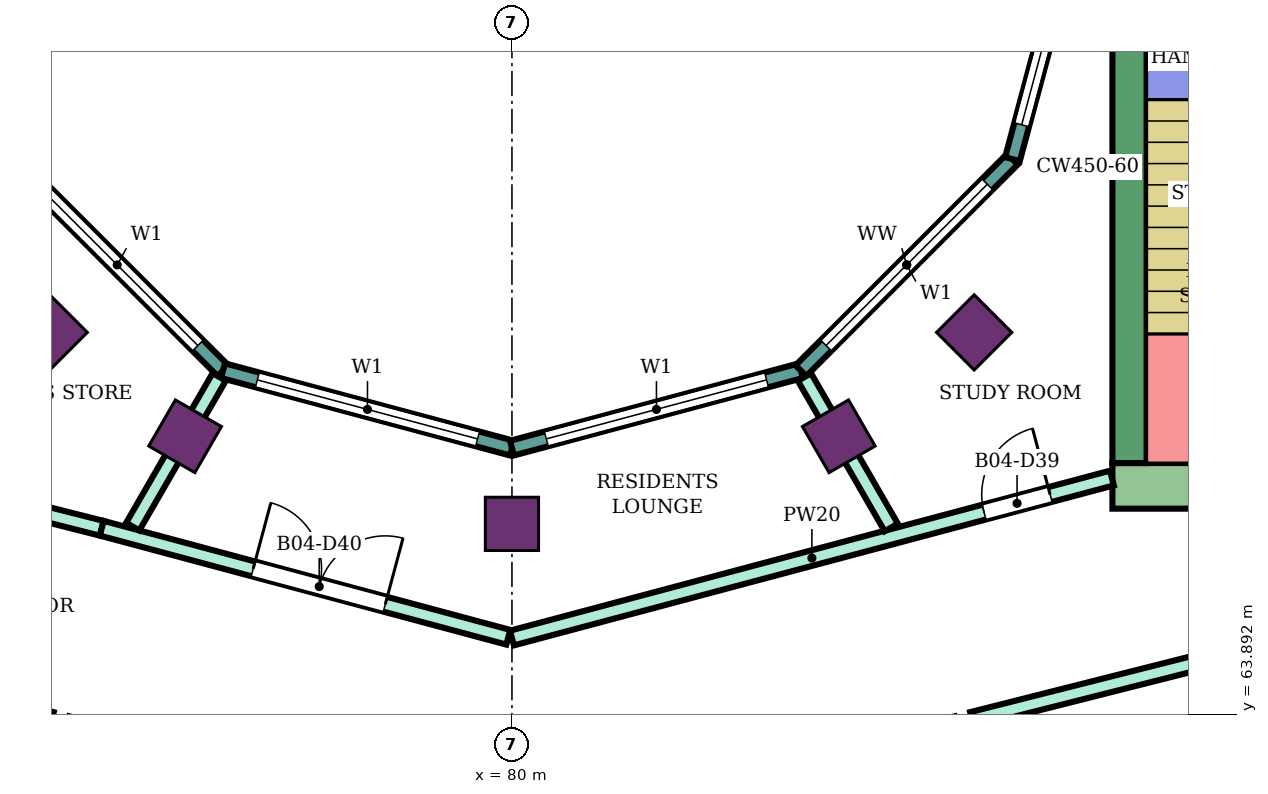
"""IFC4 building model, lengths in metres.
Left out: names, types, materials, properties, quantities, classifications, styles, units other than length and angle.
Written with IfcOpenShell. Run it as: python <this file> out.ifc"""

import sys

from ifc_helpers import new_model, si_unit, direction, frame, frame_2d, origin, origin_2d, place, context, subcontext, project, spatial, rectangle, extrude, element, fill, save


model = new_model("IFC4")
c1 = context("Model", 3, precision=1e-05, world=origin(), true_north=direction((0.0, 1.0)))
c2 = subcontext(c1, "Body", "Model", "MODEL_VIEW")
j1 = project(units=[si_unit("LENGTHUNIT", "METRE"), si_unit("PLANEANGLEUNIT", "RADIAN")], contexts=[c1])
p1 = place(None, origin())
s1 = spatial("IfcSite", under=j1, at=p1, CompositionType="ELEMENT")
p2 = place(p1, origin())
s2 = spatial("IfcBuilding", under=s1, at=p2, CompositionType="ELEMENT")
p3 = place(p2, frame((0.0, 0.0, 258.3)))
s3 = spatial("IfcBuildingStorey", under=s2, at=p3, CompositionType="ELEMENT", Elevation=258.3)
for number, where, z_axis, x_axis in (
    (1, (73.919, 68.919, 0.0), (0.0, 0.0, 1.0), (-0.707, -0.707, 0.0)),
    (2, (75.7, 67.552, 0.0), (0.0, 0.0, 1.0), (-0.5, -0.866, 0.0)),
    (3, (80.0, 66.4, 0.0), (0.0, 0.0, 1.0), (0.0, -1.0, 0.0)),
    (4, (84.3, 67.552, 0.0), (0.0, 0.0, 1.0), (0.5, -0.866, 0.0)),
    (5, (86.081, 68.919, 0.0), (0.0, 0.0, 1.0), (0.707, -0.707, 0.0)),
):
    element("IfcColumn", number, at=place(p3, frame(where, z_axis=z_axis, x_axis=x_axis)), inside=s3, PredefinedType="COLUMN", context=c2, shape_type="SweptSolid", body=[
        extrude(rectangle(XDim=0.7, YDim=0.7, at=origin_2d()), origin(), (0.0, 0.0, 1.0), 4.2),
    ])
p4 = place(p3, frame((87.9, 66.9, 0.0), z_axis=(0.0, 0.0, 1.0), x_axis=(1.0, 0.0, 0.0)))
e6 = element("IfcWall", 6, at=p4, inside=s3, PredefinedType="SHEAR", context=c2, shape_type="SweptSolid", body=[
    extrude(rectangle(XDim=14.9, YDim=0.6, at=frame_2d((7.45, 0.0))), origin(), (0.0, 0.0, 1.0), 3.88),
])
p5 = place(p4, frame((4.2, 0.0, 0.0)))
e7 = element("IfcOpeningElement", 7, at=p5, cuts=e6, PredefinedType="OPENING", context=c2, shape_type="SweptSolid", body=[
    extrude(rectangle(XDim=2.4, YDim=2.4, at=frame_2d((1.2, 1.2))), frame((0.0, 0.31, 0.0), z_axis=(0.0, -1.0, 0.0), x_axis=(1.0, 0.0, 0.0)), (0.0, 0.0, 1.0), 0.62),
])
p6 = place(p3, frame((88.125, 67.2, 0.0), z_axis=(0.0, 0.0, 1.0), x_axis=(0.0, 1.0, 0.0)))
e8 = element("IfcWall", 8, at=p6, inside=s3, PredefinedType="SHEAR", context=c2, shape_type="SweptSolid", body=[
    extrude(rectangle(XDim=7.8, YDim=0.45, at=frame_2d((3.9, 0.0))), origin(), (0.0, 0.0, 1.0), 3.88),
])
p7 = place(p3, frame((73.415, 71.198, 0.0), z_axis=(0.0, 0.0, 1.0), x_axis=(0.707106781187, -0.707106781187, 0.0)))
e9 = element("IfcWall", 9, at=p7, inside=s3, PredefinedType="NOTDEFINED", context=c2, shape_type="SweptSolid", body=[
    extrude(rectangle(XDim=3.936, YDim=0.2, at=frame_2d((1.968, 0.0))), origin(), (0.0, 0.0, 1.0), 4.2),
])
p8 = place(p7, frame((0.468, 0.0, 0.9)))
e10 = element("IfcOpeningElement", 10, at=p8, cuts=e9, PredefinedType="OPENING", context=c2, shape_type="SweptSolid", body=[
    extrude(rectangle(XDim=3.0, YDim=2.3, at=frame_2d((1.5, 1.15))), frame((0.0, 0.11, 0.0), z_axis=(0.0, -1.0, 0.0), x_axis=(1.0, 0.0, 0.0)), (0.0, 0.0, 1.0), 0.22),
])
p9 = place(p3, frame((76.198, 68.415, 0.0), z_axis=(0.0, 0.0, 1.0), x_axis=(0.965933654434, -0.258789828301, 0.0)))
e11 = element("IfcWall", 11, at=p9, inside=s3, PredefinedType="NOTDEFINED", context=c2, shape_type="SweptSolid", body=[
    extrude(rectangle(XDim=3.936, YDim=0.2, at=frame_2d((1.968, 0.0))), origin(), (0.0, 0.0, 1.0), 4.2),
])
p10 = place(p9, frame((0.468, 0.0, 0.9)))
e12 = element("IfcOpeningElement", 12, at=p10, cuts=e11, PredefinedType="OPENING", context=c2, shape_type="SweptSolid", body=[
    extrude(rectangle(XDim=3.0, YDim=2.3, at=frame_2d((1.5, 1.15))), frame((0.0, 0.11, 0.0), z_axis=(0.0, -1.0, 0.0), x_axis=(1.0, 0.0, 0.0)), (0.0, 0.0, 1.0), 0.22),
])
p11 = place(p3, frame((80.0, 67.396, 0.0), z_axis=(0.0, 0.0, 1.0), x_axis=(0.965933654434, 0.258789828301, 0.0)))
e13 = element("IfcWall", 13, at=p11, inside=s3, PredefinedType="NOTDEFINED", context=c2, shape_type="SweptSolid", body=[
    extrude(rectangle(XDim=3.936, YDim=0.2, at=frame_2d((1.968, 0.0))), origin(), (0.0, 0.0, 1.0), 4.2),
])
p12 = place(p11, frame((0.468, 0.0, 0.9)))
e14 = element("IfcOpeningElement", 14, at=p12, cuts=e13, PredefinedType="OPENING", context=c2, shape_type="SweptSolid", body=[
    extrude(rectangle(XDim=3.0, YDim=2.3, at=frame_2d((1.5, 1.15))), frame((0.0, 0.11, 0.0), z_axis=(0.0, -1.0, 0.0), x_axis=(1.0, 0.0, 0.0)), (0.0, 0.0, 1.0), 0.22),
])
p13 = place(p3, frame((83.802, 68.415, 0.0), z_axis=(0.0, 0.0, 1.0), x_axis=(0.707106781187, 0.707106781187, 0.0)))
e15 = element("IfcWall", 15, at=p13, inside=s3, PredefinedType="NOTDEFINED", context=c2, shape_type="SweptSolid", body=[
    extrude(rectangle(XDim=3.936, YDim=0.2, at=frame_2d((1.968, 0.0))), origin(), (0.0, 0.0, 1.0), 4.2),
])
p14 = place(p13, frame((0.468, 0.0, 0.9)))
e16 = element("IfcOpeningElement", 16, at=p14, cuts=e15, PredefinedType="OPENING", context=c2, shape_type="SweptSolid", body=[
    extrude(rectangle(XDim=3.0, YDim=2.3, at=frame_2d((1.5, 1.15))), frame((0.0, 0.11, 0.0), z_axis=(0.0, -1.0, 0.0), x_axis=(1.0, 0.0, 0.0)), (0.0, 0.0, 1.0), 0.22),
])
p15 = place(p3, frame((86.585, 71.198, 0.0), z_axis=(0.0, 0.0, 1.0), x_axis=(0.258789828301, 0.965933654434, 0.0)))
e17 = element("IfcWall", 17, at=p15, inside=s3, PredefinedType="NOTDEFINED", context=c2, shape_type="SweptSolid", body=[
    extrude(rectangle(XDim=3.936, YDim=0.2, at=frame_2d((1.968, 0.0))), origin(), (0.0, 0.0, 1.0), 4.2),
])
p16 = place(p15, frame((0.468, 0.0, 0.9)))
e18 = element("IfcOpeningElement", 18, at=p16, cuts=e17, PredefinedType="OPENING", context=c2, shape_type="SweptSolid", body=[
    extrude(rectangle(XDim=3.0, YDim=2.3, at=frame_2d((1.5, 1.15))), frame((0.0, 0.11, 0.0), z_axis=(0.0, -1.0, 0.0), x_axis=(1.0, 0.0, 0.0)), (0.0, 0.0, 1.0), 0.22),
])
p17 = place(p3, frame((68.2, 65.28, 0.0), z_axis=(0.0, 0.0, 1.0), x_axis=(0.969450596516, -0.245286650503, 0.0)))
e19 = element("IfcWall", 19, at=p17, inside=s3, PredefinedType="PARTITIONING", context=c2, shape_type="SweptSolid", body=[
    extrude(rectangle(XDim=5.928, YDim=0.2, at=frame_2d((2.964, 0.0))), origin(), (0.0, 0.0, 1.0), 3.75),
])
p18 = place(p3, frame((72.1, 66.975, 0.0), z_axis=(0.0, 0.0, 1.0), x_axis=(0.969471314457, -0.245204752086, 0.0)))
e20 = element("IfcWall", 20, at=p18, inside=s3, PredefinedType="PARTITIONING", context=c2, shape_type="SweptSolid", body=[
    extrude(rectangle(XDim=2.582, YDim=0.2, at=frame_2d((1.291, 0.0))), origin(), (0.0, 0.0, 1.0), 3.75),
])
p19 = place(p18, frame((0.841, 0.0, 0.0)))
e21 = element("IfcOpeningElement", 21, at=p19, cuts=e20, PredefinedType="OPENING", context=c2, shape_type="SweptSolid", body=[
    extrude(rectangle(XDim=0.9, YDim=2.1, at=frame_2d((0.45, 1.05))), frame((0.0, 0.11, 0.0), z_axis=(0.0, -1.0, 0.0), x_axis=(1.0, 0.0, 0.0)), (0.0, 0.0, 1.0), 0.22),
])
p20 = place(p3, frame((74.603, 66.342, 0.0), z_axis=(0.0, 0.0, 1.0), x_axis=(0.965895298152, -0.258932950796, 0.0)))
e22 = element("IfcWall", 22, at=p20, inside=s3, PredefinedType="PARTITIONING", context=c2, shape_type="SweptSolid", body=[
    extrude(rectangle(XDim=5.538, YDim=0.2, at=frame_2d((2.769, 0.0))), origin(), (0.0, 0.0, 1.0), 3.75),
])
p21 = place(p20, frame((2.062, 0.0, 0.0)))
e23 = element("IfcOpeningElement", 23, at=p21, cuts=e22, PredefinedType="OPENING", context=c2, shape_type="SweptSolid", body=[
    extrude(rectangle(XDim=1.8, YDim=2.1, at=frame_2d((0.9, 1.05))), frame((0.0, 0.11, 0.0), z_axis=(0.0, -1.0, 0.0), x_axis=(1.0, 0.0, 0.0)), (0.0, 0.0, 1.0), 0.22),
])
p22 = place(p3, frame((75.011, 66.364, 0.0), z_axis=(0.0, 0.0, 1.0), x_axis=(0.500121996664, 0.86595495752, 0.0)))
e24 = element("IfcWall", 24, at=p22, inside=s3, PredefinedType="PARTITIONING", context=c2, shape_type="SweptSolid", body=[
    extrude(rectangle(XDim=2.274, YDim=0.2, at=frame_2d((1.137, 0.0))), origin(), (0.0, 0.0, 1.0), 3.75),
])
p23 = place(p3, frame((80.0, 64.898, 0.0), z_axis=(0.0, 0.0, 1.0), x_axis=(0.966237419782, 0.257653349704, 0.0)))
e25 = element("IfcWall", 25, at=p23, inside=s3, PredefinedType="PARTITIONING", context=c2, shape_type="SweptSolid", body=[
    extrude(rectangle(XDim=8.169, YDim=0.2, at=frame_2d((4.084, 0.0))), origin(), (0.0, 0.0, 1.0), 3.75),
])
p24 = place(p23, frame((6.428, 0.0, 0.0)))
e26 = element("IfcOpeningElement", 26, at=p24, cuts=e25, PredefinedType="OPENING", context=c2, shape_type="SweptSolid", body=[
    extrude(rectangle(XDim=0.9, YDim=2.1, at=frame_2d((0.45, 1.05))), frame((0.0, 0.11, 0.0), z_axis=(0.0, -1.0, 0.0), x_axis=(1.0, 0.0, 0.0)), (0.0, 0.0, 1.0), 0.22),
])
p25 = place(p3, frame((83.848, 68.331, 0.0), z_axis=(0.0, 0.0, 1.0), x_axis=(0.499851978358, -0.866110847255, 0.0)))
e27 = element("IfcWall", 27, at=p25, inside=s3, PredefinedType="PARTITIONING", context=c2, shape_type="SweptSolid", body=[
    extrude(rectangle(XDim=2.284, YDim=0.2, at=frame_2d((1.142, 0.0))), origin(), (0.0, 0.0, 1.0), 3.75),
])
p26 = place(p3, frame((86.053, 63.826, 0.0), z_axis=(0.0, 0.0, 1.0), x_axis=(0.969490004987, 0.245130843083, 0.0)))
e28 = element("IfcWall", 28, at=p26, inside=s3, PredefinedType="PARTITIONING", context=c2, shape_type="SweptSolid", body=[
    extrude(rectangle(XDim=5.908, YDim=0.2, at=frame_2d((2.954, 0.0))), origin(), (0.0, 0.0, 1.0), 3.75),
])
p27 = place(p8, origin())
e29 = element("IfcWindow", 29, at=p27, inside=s3, PartitioningType="SINGLE_PANEL", PredefinedType="WINDOW", context=c2, shape_type="SweptSolid", body=[
    extrude(rectangle(XDim=3.0, YDim=2.3, at=frame_2d((1.5, 1.15))), frame((0.0, 0.03, 0.0), z_axis=(0.0, -1.0, 0.0), x_axis=(1.0, 0.0, 0.0)), (0.0, 0.0, 1.0), 0.06),
])
fill(e10, e29)
p28 = place(p10, origin())
e30 = element("IfcWindow", 30, at=p28, inside=s3, PartitioningType="SINGLE_PANEL", PredefinedType="WINDOW", context=c2, shape_type="SweptSolid", body=[
    extrude(rectangle(XDim=3.0, YDim=2.3, at=frame_2d((1.5, 1.15))), frame((0.0, 0.03, 0.0), z_axis=(0.0, -1.0, 0.0), x_axis=(1.0, 0.0, 0.0)), (0.0, 0.0, 1.0), 0.06),
])
fill(e12, e30)
p29 = place(p12, origin())
e31 = element("IfcWindow", 31, at=p29, inside=s3, PartitioningType="SINGLE_PANEL", PredefinedType="WINDOW", context=c2, shape_type="SweptSolid", body=[
    extrude(rectangle(XDim=3.0, YDim=2.3, at=frame_2d((1.5, 1.15))), frame((0.0, 0.03, 0.0), z_axis=(0.0, -1.0, 0.0), x_axis=(1.0, 0.0, 0.0)), (0.0, 0.0, 1.0), 0.06),
])
fill(e14, e31)
p30 = place(p14, origin())
e32 = element("IfcWindow", 32, at=p30, inside=s3, PartitioningType="SINGLE_PANEL", PredefinedType="WINDOW", context=c2, shape_type="SweptSolid", body=[
    extrude(rectangle(XDim=3.0, YDim=2.3, at=frame_2d((1.5, 1.15))), frame((0.0, 0.03, 0.0), z_axis=(0.0, -1.0, 0.0), x_axis=(1.0, 0.0, 0.0)), (0.0, 0.0, 1.0), 0.06),
])
fill(e16, e32)
p31 = place(p16, origin())
e33 = element("IfcWindow", 33, at=p31, inside=s3, PartitioningType="SINGLE_PANEL", PredefinedType="WINDOW", context=c2, shape_type="SweptSolid", body=[
    extrude(rectangle(XDim=3.0, YDim=2.3, at=frame_2d((1.5, 1.15))), frame((0.0, 0.03, 0.0), z_axis=(0.0, -1.0, 0.0), x_axis=(1.0, 0.0, 0.0)), (0.0, 0.0, 1.0), 0.06),
])
fill(e18, e33)
p32 = place(p24, origin())
e34 = element("IfcDoor", 34, at=p32, inside=s3, OperationType="SINGLE_SWING_RIGHT", PredefinedType="DOOR", context=c2, shape_type="SweptSolid", body=[
    extrude(rectangle(XDim=0.9, YDim=2.1, at=frame_2d((0.45, 1.05))), frame((0.0, 0.025, 0.0), z_axis=(0.0, -1.0, 0.0), x_axis=(1.0, 0.0, 0.0)), (0.0, 0.0, 1.0), 0.05),
])
fill(e26, e34)
p33 = place(p21, origin())
e35 = element("IfcDoor", 35, at=p33, inside=s3, OperationType="DOUBLE_DOOR_SINGLE_SWING", PredefinedType="DOOR", context=c2, shape_type="SweptSolid", body=[
    extrude(rectangle(XDim=1.8, YDim=2.1, at=frame_2d((0.9, 1.05))), frame((0.0, 0.025, 0.0), z_axis=(0.0, -1.0, 0.0), x_axis=(1.0, 0.0, 0.0)), (0.0, 0.0, 1.0), 0.05),
])
fill(e23, e35)
save(model, sys.argv[1])
